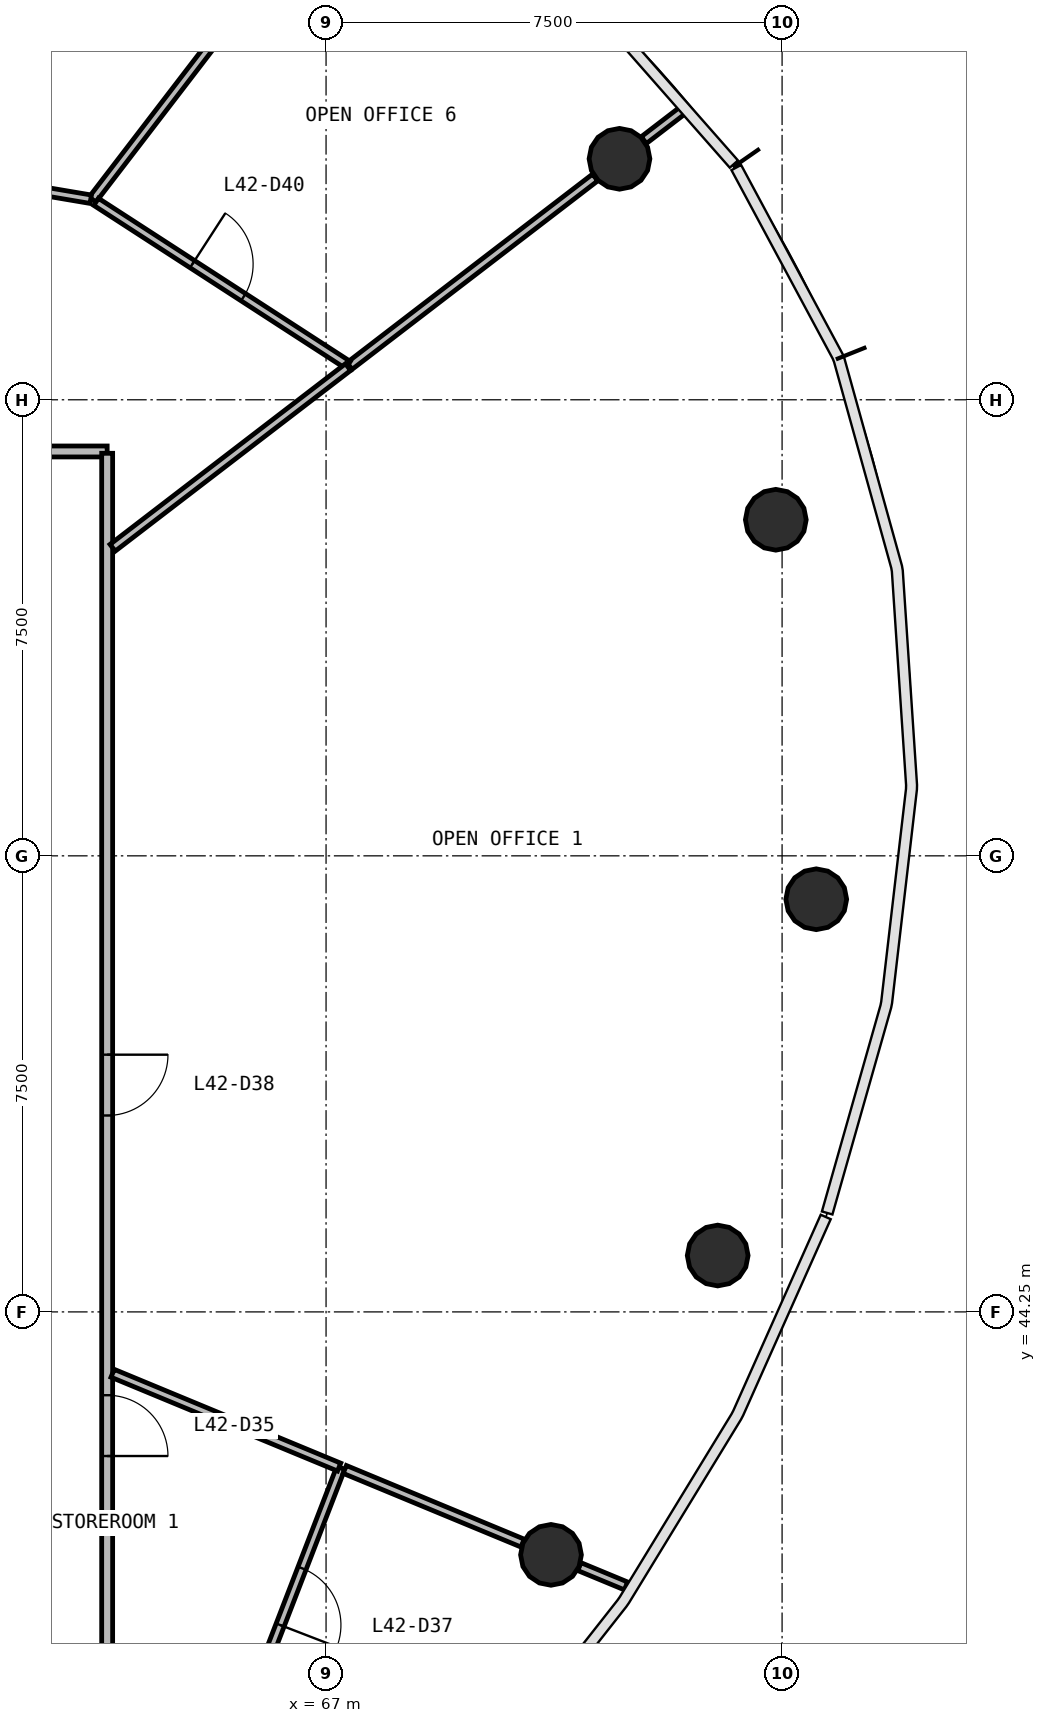
"""IFC4 building model, lengths in metres.
Left out: names, types, materials, properties, quantities, classifications, styles, units other than length and angle.
Written with IfcOpenShell. Run it as: python <this file> out.ifc"""

import sys

from ifc_helpers import new_model, si_unit, direction, frame, frame_2d, origin, origin_2d, place, context, subcontext, project, spatial, rectangle, circle, extrude, source, transform, mapped, element, fill, save


model = new_model("IFC4")
c1 = context("Model", 3, precision=1e-05, world=origin(), true_north=direction((0.0, 1.0)))
c2 = subcontext(c1, "Body", "Model", "MODEL_VIEW")
j1 = project(units=[si_unit("LENGTHUNIT", "METRE"), si_unit("PLANEANGLEUNIT", "RADIAN")], contexts=[c1])
p1 = place(None, origin())
s1 = spatial("IfcSite", under=j1, at=p1, CompositionType="ELEMENT")
p2 = place(p1, origin())
s2 = spatial("IfcBuilding", under=s1, at=p2, CompositionType="ELEMENT")
p3 = place(p2, frame((0.0, 0.0, 176.0)))
s3 = spatial("IfcBuildingStorey", under=s2, at=p3, CompositionType="ELEMENT", Elevation=176.0)
m1 = source(origin(), c2, "Body", "SweptSolid", [
    extrude(circle(Radius=0.5, at=origin_2d()), origin(), (0.0, 0.0, 1.0), 3.9),
])
for number, where, z_axis, x_axis in (
    (1, (75.062, 51.036, 0.0), (0.0, 0.0, 1.0), (1.0, 0.0, 0.0)),
    (2, (74.397, 57.277, 0.0), (0.0, 0.0, 1.0), (1.0, 0.0, 0.0)),
    (3, (71.826, 63.213, 0.0), (0.0, 0.0, 1.0), (1.0, 0.0, 0.0)),
    (4, (70.699, 40.254, 0.0), (0.0, 0.0, 1.0), (1.0, 0.0, 0.0)),
    (5, (73.441, 45.177, 0.0), (0.0, 0.0, 1.0), (1.0, 0.0, 0.0)),
):
    element("IfcColumn", number, at=place(p3, frame(where, z_axis=z_axis, x_axis=x_axis)), inside=s3, PredefinedType="COLUMN", context=c2, shape_type="MappedRepresentation", body=[
        mapped(m1, transform((0.0, 0.0, 0.0), scale=1.0)),
    ])
p4 = place(p3, frame((40.6, 58.4, 0.0), z_axis=(0.0, 0.0, 1.0), x_axis=(1.0, 0.0, 0.0)))
e6 = element("IfcWall", 6, at=p4, inside=s3, PredefinedType="PARTITIONING", context=c2, shape_type="SweptSolid", body=[
    extrude(rectangle(XDim=22.8, YDim=0.18, at=frame_2d((11.4, 0.0))), origin(), (0.0, 0.0, 1.0), 2.7),
])
p5 = place(p4, frame((2.05, 0.0, 0.0)))
e7 = element("IfcOpeningElement", 7, at=p5, cuts=e6, PredefinedType="OPENING", context=c2, shape_type="SweptSolid", body=[
    extrude(rectangle(XDim=0.9, YDim=2.1, at=frame_2d((0.45, 1.05))), frame((0.0, 0.1, 0.0), z_axis=(0.0, -1.0, 0.0), x_axis=(1.0, 0.0, 0.0)), (0.0, 0.0, 1.0), 0.2),
])
p6 = place(p4, frame((16.15, 0.0, 0.0)))
e8 = element("IfcOpeningElement", 8, at=p6, cuts=e6, PredefinedType="OPENING", context=c2, shape_type="SweptSolid", body=[
    extrude(rectangle(XDim=1.0, YDim=2.1, at=frame_2d((0.5, 1.05))), frame((0.0, 0.1, 0.0), z_axis=(0.0, -1.0, 0.0), x_axis=(1.0, 0.0, 0.0)), (0.0, 0.0, 1.0), 0.2),
])
p7 = place(p4, frame((10.95, 0.0, 0.0)))
e9 = element("IfcOpeningElement", 9, at=p7, cuts=e6, PredefinedType="OPENING", context=c2, shape_type="SweptSolid", body=[
    extrude(rectangle(XDim=1.0, YDim=2.1, at=frame_2d((0.5, 1.05))), frame((0.0, 0.1, 0.0), z_axis=(0.0, -1.0, 0.0), x_axis=(1.0, 0.0, 0.0)), (0.0, 0.0, 1.0), 0.2),
])
p8 = place(p4, frame((5.75, 0.0, 0.0)))
e10 = element("IfcOpeningElement", 10, at=p8, cuts=e6, PredefinedType="OPENING", context=c2, shape_type="SweptSolid", body=[
    extrude(rectangle(XDim=1.0, YDim=2.1, at=frame_2d((0.5, 1.05))), frame((0.0, 0.1, 0.0), z_axis=(0.0, -1.0, 0.0), x_axis=(1.0, 0.0, 0.0)), (0.0, 0.0, 1.0), 0.2),
])
p9 = place(p3, frame((63.4, 58.37, 0.0), z_axis=(0.0, 0.0, 1.0), x_axis=(0.0, -1.0, 0.0)))
e11 = element("IfcWall", 11, at=p9, inside=s3, PredefinedType="PARTITIONING", context=c2, shape_type="SweptSolid", body=[
    extrude(rectangle(XDim=20.74, YDim=0.18, at=frame_2d((10.37, 0.0))), origin(), (0.0, 0.0, 1.0), 2.7),
])
p10 = place(p9, frame((15.49, 0.0, 0.0)))
e12 = element("IfcOpeningElement", 12, at=p10, cuts=e11, PredefinedType="OPENING", context=c2, shape_type="SweptSolid", body=[
    extrude(rectangle(XDim=1.0, YDim=2.1, at=frame_2d((0.5, 1.05))), frame((0.0, 0.1, 0.0), z_axis=(0.0, -1.0, 0.0), x_axis=(1.0, 0.0, 0.0)), (0.0, 0.0, 1.0), 0.2),
])
p11 = place(p9, frame((9.89, 0.0, 0.0)))
e13 = element("IfcOpeningElement", 13, at=p11, cuts=e11, PredefinedType="OPENING", context=c2, shape_type="SweptSolid", body=[
    extrude(rectangle(XDim=1.0, YDim=2.1, at=frame_2d((0.5, 1.05))), frame((0.0, 0.1, 0.0), z_axis=(0.0, -1.0, 0.0), x_axis=(1.0, 0.0, 0.0)), (0.0, 0.0, 1.0), 0.2),
])
p12 = place(p3, frame((63.159, 62.543, 0.0), z_axis=(0.0, 0.0, 1.0), x_axis=(0.608780216018, 0.793338924159, 0.0)))
e14 = element("IfcWall", 14, at=p12, inside=s3, PredefinedType="PARTITIONING", context=c2, shape_type="SweptSolid", body=[
    extrude(rectangle(XDim=5.188, YDim=0.14, at=frame_2d((2.594, 0.0))), origin(), (0.0, 0.0, 1.0), 2.7),
])
p13 = place(p3, frame((67.386, 59.806, 0.0), z_axis=(0.0, 0.0, 1.0), x_axis=(0.79337017358, 0.608739490811, 0.0)))
e15 = element("IfcWall", 15, at=p13, inside=s3, PredefinedType="PARTITIONING", context=c2, shape_type="SweptSolid", body=[
    extrude(rectangle(XDim=5.092, YDim=0.14, at=frame_2d((2.546, 0.0))), origin(), (0.0, 0.0, 1.0), 2.7),
])
p14 = place(p3, frame((63.218, 62.505, 0.0), z_axis=(0.0, 0.0, 1.0), x_axis=(0.839336490457, -0.543612229247, 0.0)))
e16 = element("IfcWall", 16, at=p14, inside=s3, PredefinedType="PARTITIONING", context=c2, shape_type="SweptSolid", body=[
    extrude(rectangle(XDim=4.935, YDim=0.14, at=frame_2d((2.468, 0.0))), origin(), (0.0, 0.0, 1.0), 2.7),
])
p15 = place(p14, frame((1.885, 0.0, 0.0)))
e17 = element("IfcOpeningElement", 17, at=p15, cuts=e16, PredefinedType="OPENING", context=c2, shape_type="SweptSolid", body=[
    extrude(rectangle(XDim=1.0, YDim=2.1, at=frame_2d((0.5, 1.05))), frame((0.0, 0.08, 0.0), z_axis=(0.0, -1.0, 0.0), x_axis=(1.0, 0.0, 0.0)), (0.0, 0.0, 1.0), 0.16),
])
p16 = place(p3, frame((63.49, 56.817, 0.0), z_axis=(0.0, 0.0, 1.0), x_axis=(0.793354275357, 0.608760210405, 0.0)))
e18 = element("IfcWall", 18, at=p16, inside=s3, PredefinedType="PARTITIONING", context=c2, shape_type="SweptSolid", body=[
    extrude(rectangle(XDim=4.88, YDim=0.14, at=frame_2d((2.44, 0.0))), origin(), (0.0, 0.0, 1.0), 2.7),
])
p17 = place(p3, frame((58.39, 63.35, 0.0), z_axis=(0.0, 0.0, 1.0), x_axis=(0.985986026567, -0.166827921569, 0.0)))
e19 = element("IfcWall", 19, at=p17, inside=s3, PredefinedType="PARTITIONING", context=c2, shape_type="SweptSolid", body=[
    extrude(rectangle(XDim=4.807, YDim=0.14, at=frame_2d((2.404, 0.0))), origin(), (0.0, 0.0, 1.0), 2.7),
])
p18 = place(p17, frame((1.957, 0.0, 0.0)))
e20 = element("IfcOpeningElement", 20, at=p18, cuts=e19, PredefinedType="OPENING", context=c2, shape_type="SweptSolid", body=[
    extrude(rectangle(XDim=1.0, YDim=2.1, at=frame_2d((0.5, 1.05))), frame((0.0, 0.08, 0.0), z_axis=(0.0, -1.0, 0.0), x_axis=(1.0, 0.0, 0.0)), (0.0, 0.0, 1.0), 0.16),
])
p19 = place(p3, frame((67.243, 41.686, 0.0), z_axis=(0.0, 0.0, 1.0), x_axis=(-0.36010004646, -0.932913691903, 0.0)))
e21 = element("IfcWall", 21, at=p19, inside=s3, PredefinedType="PARTITIONING", context=c2, shape_type="SweptSolid", body=[
    extrude(rectangle(XDim=4.421, YDim=0.14, at=frame_2d((2.21, 0.0))), origin(), (0.0, 0.0, 1.0), 2.7),
])
p20 = place(p19, frame((1.771, 0.0, 0.0)))
e22 = element("IfcOpeningElement", 22, at=p20, cuts=e21, PredefinedType="OPENING", context=c2, shape_type="SweptSolid", body=[
    extrude(rectangle(XDim=1.0, YDim=2.1, at=frame_2d((0.5, 1.05))), frame((0.0, 0.08, 0.0), z_axis=(0.0, -1.0, 0.0), x_axis=(1.0, 0.0, 0.0)), (0.0, 0.0, 1.0), 0.16),
])
p21 = place(p3, frame((63.49, 43.241, 0.0), z_axis=(0.0, 0.0, 1.0), x_axis=(0.923881042502, -0.382679786906, 0.0)))
e23 = element("IfcWall", 23, at=p21, inside=s3, PredefinedType="PARTITIONING", context=c2, shape_type="SweptSolid", body=[
    extrude(rectangle(XDim=4.032, YDim=0.14, at=frame_2d((2.016, 0.0))), origin(), (0.0, 0.0, 1.0), 2.7),
])
p22 = place(p3, frame((67.307, 41.659, 0.0), z_axis=(0.0, 0.0, 1.0), x_axis=(0.923882446808, -0.382676396554, 0.0)))
e24 = element("IfcWall", 24, at=p22, inside=s3, PredefinedType="PARTITIONING", context=c2, shape_type="SweptSolid", body=[
    extrude(rectangle(XDim=3.166, YDim=0.14, at=frame_2d((1.583, 0.0))), origin(), (0.0, 0.0, 1.0), 2.7),
])
p23 = place(p3, frame((72.226, 63.52, 0.0), z_axis=(0.0, 0.0, 1.0), x_axis=(0.793296212725, 0.608835871871, 0.0)))
e25 = element("IfcWall", 25, at=p23, inside=s3, PredefinedType="PARTITIONING", context=c2, shape_type="SweptSolid", body=[
    extrude(rectangle(XDim=0.836, YDim=0.14, at=frame_2d((0.418, 0.0))), origin(), (0.0, 0.0, 1.0), 2.7),
])
p24 = place(p3, frame((71.166, 40.061, 0.0), z_axis=(0.0, 0.0, 1.0), x_axis=(0.923909393783, -0.382611332921, 0.0)))
e26 = element("IfcWall", 26, at=p24, inside=s3, PredefinedType="PARTITIONING", context=c2, shape_type="SweptSolid", body=[
    extrude(rectangle(XDim=0.831, YDim=0.14, at=frame_2d((0.416, 0.0))), origin(), (0.0, 0.0, 1.0), 2.7),
])
m2 = source(origin(), c2, "Body", "SweptSolid", [
    extrude(rectangle(XDim=1.0, YDim=2.1, at=frame_2d((0.5, 1.05))), frame((0.0, 0.025, 0.0), z_axis=(0.0, -1.0, 0.0), x_axis=(1.0, 0.0, 0.0)), (0.0, 0.0, 1.0), 0.05),
])
p25 = place(p10, origin())
e27 = element("IfcDoor", 27, at=p25, inside=s3, OperationType="SINGLE_SWING_RIGHT", PredefinedType="DOOR", context=c2, shape_type="MappedRepresentation", body=[
    mapped(m2, transform((0.0, 0.0, 0.0), scale=1.0)),
])
fill(e12, e27)
p26 = place(p20, origin())
e28 = element("IfcDoor", 28, at=p26, inside=s3, OperationType="SINGLE_SWING_RIGHT", PredefinedType="DOOR", context=c2, shape_type="MappedRepresentation", body=[
    mapped(m2, transform((0.0, 0.0, 0.0), scale=1.0)),
])
fill(e22, e28)
p27 = place(p11, origin())
e29 = element("IfcDoor", 29, at=p27, inside=s3, OperationType="SINGLE_SWING_LEFT", PredefinedType="DOOR", context=c2, shape_type="MappedRepresentation", body=[
    mapped(m2, transform((0.0, 0.0, 0.0), scale=1.0)),
])
fill(e13, e29)
p28 = place(p15, origin())
e30 = element("IfcDoor", 30, at=p28, inside=s3, OperationType="SINGLE_SWING_LEFT", PredefinedType="DOOR", context=c2, shape_type="MappedRepresentation", body=[
    mapped(m2, transform((0.0, 0.0, 0.0), scale=1.0)),
])
fill(e17, e30)
save(model, sys.argv[1])
